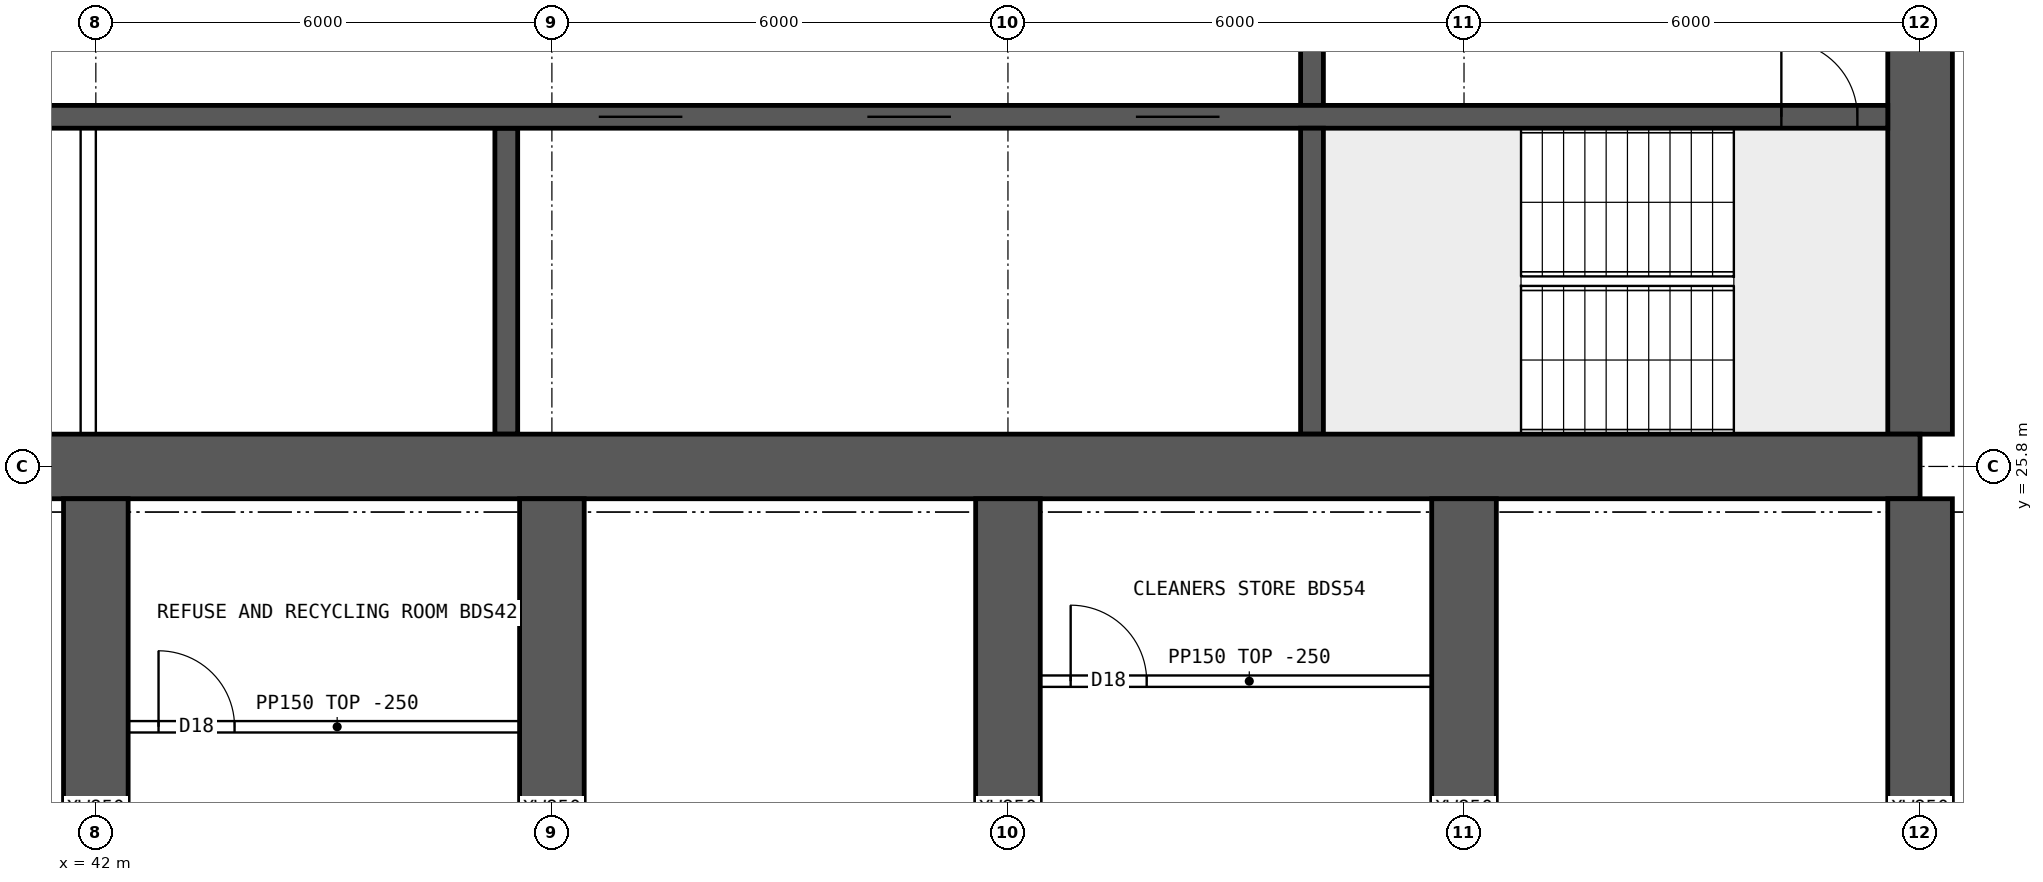
"""IFC4 building model, lengths in metres.
Left out: names, types, materials, properties, quantities, classifications, styles, units other than length and angle.
Written with IfcOpenShell. Run it as: python <this file> out.ifc"""

import sys

from ifc_helpers import new_model, si_unit, direction, frame, frame_2d, origin, place, context, subcontext, project, spatial, rectangle, extrude, element, fill, save


model = new_model("IFC4")
c1 = context("Model", 3, precision=1e-05, world=origin(), true_north=direction((0.0, 1.0)))
c2 = subcontext(c1, "Body", "Model", "MODEL_VIEW")
j1 = project(units=[si_unit("LENGTHUNIT", "METRE"), si_unit("PLANEANGLEUNIT", "RADIAN")], contexts=[c1])
p1 = place(None, origin())
s1 = spatial("IfcSite", under=j1, at=p1, CompositionType="ELEMENT")
p2 = place(p1, origin())
s2 = spatial("IfcBuilding", under=s1, at=p2, CompositionType="ELEMENT")
p3 = place(p2, frame((0.0, 0.0, 186.1)))
s3 = spatial("IfcBuildingStorey", under=s2, at=p3, CompositionType="ELEMENT", Elevation=186.1)
p4 = place(p3, frame((18.0, 25.8, 0.0), z_axis=(0.0, 0.0, 1.0), x_axis=(1.0, 0.0, 0.0)))
e1 = element("IfcWall", 1, at=p4, inside=s3, PredefinedType="SHEAR", context=c2, shape_type="SweptSolid", body=[
    extrude(rectangle(XDim=48.0, YDim=0.85, at=frame_2d((24.0, 0.0))), origin(), (0.0, 0.0, 1.0), 3.75),
])
p5 = place(p3, frame((66.0, 26.225, 0.0), z_axis=(0.0, 0.0, 1.0), x_axis=(0.0, 1.0, 0.0)))
e2 = element("IfcWall", 2, at=p5, inside=s3, PredefinedType="SHEAR", context=c2, shape_type="SweptSolid", body=[
    extrude(rectangle(XDim=11.55, YDim=0.85, at=frame_2d((5.775, 0.0))), origin(), (0.0, 0.0, 1.0), 3.75),
])
p6 = place(p5, frame((5.075, 0.0, 0.0)))
e3 = element("IfcOpeningElement", 3, at=p6, cuts=e2, PredefinedType="OPENING", context=c2, shape_type="SweptSolid", body=[
    extrude(rectangle(XDim=1.2, YDim=2.1, at=frame_2d((0.6, 1.05))), frame((0.0, 0.435, 0.0), z_axis=(0.0, -1.0, 0.0), x_axis=(1.0, 0.0, 0.0)), (0.0, 0.0, 1.0), 0.87),
])
p7 = place(p3, frame((18.425, 30.4, 0.0), z_axis=(0.0, 0.0, 1.0), x_axis=(1.0, 0.0, 0.0)))
e4 = element("IfcWall", 4, at=p7, inside=s3, PredefinedType="SHEAR", context=c2, shape_type="SweptSolid", body=[
    extrude(rectangle(XDim=47.15, YDim=0.3, at=frame_2d((23.575, 0.0))), origin(), (0.0, 0.0, 1.0), 3.75),
])
p8 = place(p7, frame((0.4, 0.0, 0.0)))
e5 = element("IfcOpeningElement", 5, at=p8, cuts=e4, PredefinedType="OPENING", context=c2, shape_type="SweptSolid", body=[
    extrude(rectangle(XDim=1.0, YDim=2.1, at=frame_2d((0.5, 1.05))), frame((0.0, 0.16, 0.0), z_axis=(0.0, -1.0, 0.0), x_axis=(1.0, 0.0, 0.0)), (0.0, 0.0, 1.0), 0.32),
])
p9 = place(p7, frame((45.75, 0.0, 0.0)))
e6 = element("IfcOpeningElement", 6, at=p9, cuts=e4, PredefinedType="OPENING", context=c2, shape_type="SweptSolid", body=[
    extrude(rectangle(XDim=1.0, YDim=2.1, at=frame_2d((0.5, 1.05))), frame((0.0, 0.16, 0.0), z_axis=(0.0, -1.0, 0.0), x_axis=(1.0, 0.0, 0.0)), (0.0, 0.0, 1.0), 0.32),
])
p10 = place(p7, frame((8.325, 0.0, 0.0)))
e7 = element("IfcOpeningElement", 7, at=p10, cuts=e4, PredefinedType="OPENING", context=c2, shape_type="SweptSolid", body=[
    extrude(rectangle(XDim=1.1, YDim=2.1, at=frame_2d((0.55, 1.05))), frame((0.0, 0.16, 0.0), z_axis=(0.0, -1.0, 0.0), x_axis=(1.0, 0.0, 0.0)), (0.0, 0.0, 1.0), 0.32),
])
p11 = place(p7, frame((10.925, 0.0, 0.0)))
e8 = element("IfcOpeningElement", 8, at=p11, cuts=e4, PredefinedType="OPENING", context=c2, shape_type="SweptSolid", body=[
    extrude(rectangle(XDim=1.1, YDim=2.1, at=frame_2d((0.55, 1.05))), frame((0.0, 0.16, 0.0), z_axis=(0.0, -1.0, 0.0), x_axis=(1.0, 0.0, 0.0)), (0.0, 0.0, 1.0), 0.32),
])
p12 = place(p7, frame((13.525, 0.0, 0.0)))
e9 = element("IfcOpeningElement", 9, at=p12, cuts=e4, PredefinedType="OPENING", context=c2, shape_type="SweptSolid", body=[
    extrude(rectangle(XDim=1.1, YDim=2.1, at=frame_2d((0.55, 1.05))), frame((0.0, 0.16, 0.0), z_axis=(0.0, -1.0, 0.0), x_axis=(1.0, 0.0, 0.0)), (0.0, 0.0, 1.0), 0.32),
])
p13 = place(p7, frame((16.125, 0.0, 0.0)))
e10 = element("IfcOpeningElement", 10, at=p13, cuts=e4, PredefinedType="OPENING", context=c2, shape_type="SweptSolid", body=[
    extrude(rectangle(XDim=1.1, YDim=2.1, at=frame_2d((0.55, 1.05))), frame((0.0, 0.16, 0.0), z_axis=(0.0, -1.0, 0.0), x_axis=(1.0, 0.0, 0.0)), (0.0, 0.0, 1.0), 0.32),
])
p14 = place(p7, frame((18.9, 0.0, 0.0)))
e11 = element("IfcOpeningElement", 11, at=p14, cuts=e4, PredefinedType="OPENING", context=c2, shape_type="SweptSolid", body=[
    extrude(rectangle(XDim=0.9, YDim=2.1, at=frame_2d((0.45, 1.05))), frame((0.0, 0.16, 0.0), z_axis=(0.0, -1.0, 0.0), x_axis=(1.0, 0.0, 0.0)), (0.0, 0.0, 1.0), 0.32),
])
p15 = place(p7, frame((30.192, 0.0, 0.0)))
e12 = element("IfcOpeningElement", 12, at=p15, cuts=e4, PredefinedType="OPENING", context=c2, shape_type="SweptSolid", body=[
    extrude(rectangle(XDim=1.1, YDim=2.1, at=frame_2d((0.55, 1.05))), frame((0.0, 0.16, 0.0), z_axis=(0.0, -1.0, 0.0), x_axis=(1.0, 0.0, 0.0)), (0.0, 0.0, 1.0), 0.32),
])
p16 = place(p7, frame((33.725, 0.0, 0.0)))
e13 = element("IfcOpeningElement", 13, at=p16, cuts=e4, PredefinedType="OPENING", context=c2, shape_type="SweptSolid", body=[
    extrude(rectangle(XDim=1.1, YDim=2.1, at=frame_2d((0.55, 1.05))), frame((0.0, 0.16, 0.0), z_axis=(0.0, -1.0, 0.0), x_axis=(1.0, 0.0, 0.0)), (0.0, 0.0, 1.0), 0.32),
])
p17 = place(p7, frame((37.258, 0.0, 0.0)))
e14 = element("IfcOpeningElement", 14, at=p17, cuts=e4, PredefinedType="OPENING", context=c2, shape_type="SweptSolid", body=[
    extrude(rectangle(XDim=1.1, YDim=2.1, at=frame_2d((0.55, 1.05))), frame((0.0, 0.16, 0.0), z_axis=(0.0, -1.0, 0.0), x_axis=(1.0, 0.0, 0.0)), (0.0, 0.0, 1.0), 0.32),
])
p18 = place(p3, frame((58.0, 26.225, 0.0), z_axis=(0.0, 0.0, 1.0), x_axis=(0.0, 1.0, 0.0)))
e15 = element("IfcWall", 15, at=p18, inside=s3, PredefinedType="SHEAR", context=c2, shape_type="SweptSolid", body=[
    extrude(rectangle(XDim=4.025, YDim=0.3, at=frame_2d((2.012, 0.0))), origin(), (0.0, 0.0, 1.0), 3.75),
])
p19 = place(p3, frame((58.0, 30.55, 0.0), z_axis=(0.0, 0.0, 1.0), x_axis=(0.0, 1.0, 0.0)))
e16 = element("IfcWall", 16, at=p19, inside=s3, PredefinedType="SHEAR", context=c2, shape_type="SweptSolid", body=[
    extrude(rectangle(XDim=3.9, YDim=0.3, at=frame_2d((1.95, 0.0))), origin(), (0.0, 0.0, 1.0), 3.75),
])
p20 = place(p19, frame((1.4, 0.0, 0.0)))
e17 = element("IfcOpeningElement", 17, at=p20, cuts=e16, PredefinedType="OPENING", context=c2, shape_type="SweptSolid", body=[
    extrude(rectangle(XDim=1.2, YDim=2.1, at=frame_2d((0.6, 1.05))), frame((0.0, 0.16, 0.0), z_axis=(0.0, -1.0, 0.0), x_axis=(1.0, 0.0, 0.0)), (0.0, 0.0, 1.0), 0.32),
])
p21 = place(p3, frame((47.4, 26.225, 0.0), z_axis=(0.0, 0.0, 1.0), x_axis=(0.0, 1.0, 0.0)))
e18 = element("IfcWall", 18, at=p21, inside=s3, PredefinedType="SHEAR", context=c2, shape_type="SweptSolid", body=[
    extrude(rectangle(XDim=4.025, YDim=0.3, at=frame_2d((2.012, 0.0))), origin(), (0.0, 0.0, 1.0), 3.75),
])
for number, where, z_axis, x_axis in (
    (19, (42.0, 17.2, 0.0), (0.0, 0.0, 1.0), (0.0, 1.0, 0.0)),
    (20, (48.0, 17.2, 0.0), (0.0, 0.0, 1.0), (0.0, 1.0, 0.0)),
    (21, (54.0, 17.2, 0.0), (0.0, 0.0, 1.0), (0.0, 1.0, 0.0)),
    (22, (60.0, 17.2, 0.0), (0.0, 0.0, 1.0), (0.0, 1.0, 0.0)),
    (23, (66.0, 17.2, 0.0), (0.0, 0.0, 1.0), (0.0, 1.0, 0.0)),
):
    element("IfcWall", number, at=place(p3, frame(where, z_axis=z_axis, x_axis=x_axis)), inside=s3, PredefinedType="SHEAR", context=c2, shape_type="SweptSolid", body=[
        extrude(rectangle(XDim=8.175, YDim=0.85, at=frame_2d((4.087, 0.0))), origin(), (0.0, 0.0, 1.0), 3.75),
    ])
p22 = place(p3, frame((41.9, 26.225, 0.0), z_axis=(0.0, 0.0, 1.0), x_axis=(0.0, 1.0, 0.0)))
e24 = element("IfcWall", 24, at=p22, inside=s3, PredefinedType="SOLIDWALL", context=c2, shape_type="SweptSolid", body=[
    extrude(rectangle(XDim=4.025, YDim=0.2, at=frame_2d((2.012, 0.0))), origin(), (0.0, 0.0, 1.0), 3.5),
])
p23 = place(p3, frame((42.425, 22.375, 0.0), z_axis=(0.0, 0.0, 1.0), x_axis=(1.0, 0.0, 0.0)))
e25 = element("IfcWall", 25, at=p23, inside=s3, PredefinedType="PARTITIONING", context=c2, shape_type="SweptSolid", body=[
    extrude(rectangle(XDim=5.5, YDim=0.15, at=frame_2d((2.75, 0.0))), origin(), (0.0, 0.0, 1.0), 3.5),
])
p24 = place(p23, frame((0.4, 0.0, 0.0)))
e26 = element("IfcOpeningElement", 26, at=p24, cuts=e25, PredefinedType="OPENING", context=c2, shape_type="SweptSolid", body=[
    extrude(rectangle(XDim=1.0, YDim=2.1, at=frame_2d((0.5, 1.05))), frame((0.0, 0.085, 0.0), z_axis=(0.0, -1.0, 0.0), x_axis=(1.0, 0.0, 0.0)), (0.0, 0.0, 1.0), 0.17),
])
p25 = place(p3, frame((54.425, 22.975, 0.0), z_axis=(0.0, 0.0, 1.0), x_axis=(1.0, 0.0, 0.0)))
e27 = element("IfcWall", 27, at=p25, inside=s3, PredefinedType="PARTITIONING", context=c2, shape_type="SweptSolid", body=[
    extrude(rectangle(XDim=5.5, YDim=0.15, at=frame_2d((2.75, 0.0))), origin(), (0.0, 0.0, 1.0), 3.5),
])
p26 = place(p25, frame((0.4, 0.0, 0.0)))
e28 = element("IfcOpeningElement", 28, at=p26, cuts=e27, PredefinedType="OPENING", context=c2, shape_type="SweptSolid", body=[
    extrude(rectangle(XDim=1.0, YDim=2.1, at=frame_2d((0.5, 1.05))), frame((0.0, 0.085, 0.0), z_axis=(0.0, -1.0, 0.0), x_axis=(1.0, 0.0, 0.0)), (0.0, 0.0, 1.0), 0.17),
])
p27 = place(p9, origin())
e29 = element("IfcDoor", 29, at=p27, inside=s3, OperationType="SINGLE_SWING_LEFT", PredefinedType="DOOR", context=c2, shape_type="SweptSolid", body=[
    extrude(rectangle(XDim=1.0, YDim=2.1, at=frame_2d((0.5, 1.05))), frame((0.0, 0.025, 0.0), z_axis=(0.0, -1.0, 0.0), x_axis=(1.0, 0.0, 0.0)), (0.0, 0.0, 1.0), 0.05),
])
fill(e6, e29)
p28 = place(p15, origin())
e30 = element("IfcDoor", 30, at=p28, inside=s3, OperationType="DOUBLE_DOOR_SLIDING", PredefinedType="DOOR", context=c2, shape_type="SweptSolid", body=[
    extrude(rectangle(XDim=1.1, YDim=2.1, at=frame_2d((0.55, 1.05))), frame((0.0, 0.025, 0.0), z_axis=(0.0, -1.0, 0.0), x_axis=(1.0, 0.0, 0.0)), (0.0, 0.0, 1.0), 0.05),
])
fill(e12, e30)
p29 = place(p16, origin())
e31 = element("IfcDoor", 31, at=p29, inside=s3, OperationType="DOUBLE_DOOR_SLIDING", PredefinedType="DOOR", context=c2, shape_type="SweptSolid", body=[
    extrude(rectangle(XDim=1.1, YDim=2.1, at=frame_2d((0.55, 1.05))), frame((0.0, 0.025, 0.0), z_axis=(0.0, -1.0, 0.0), x_axis=(1.0, 0.0, 0.0)), (0.0, 0.0, 1.0), 0.05),
])
fill(e13, e31)
p30 = place(p17, origin())
e32 = element("IfcDoor", 32, at=p30, inside=s3, OperationType="DOUBLE_DOOR_SLIDING", PredefinedType="DOOR", context=c2, shape_type="SweptSolid", body=[
    extrude(rectangle(XDim=1.1, YDim=2.1, at=frame_2d((0.55, 1.05))), frame((0.0, 0.025, 0.0), z_axis=(0.0, -1.0, 0.0), x_axis=(1.0, 0.0, 0.0)), (0.0, 0.0, 1.0), 0.05),
])
fill(e14, e32)
p31 = place(p24, origin())
e33 = element("IfcDoor", 33, at=p31, inside=s3, OperationType="SINGLE_SWING_LEFT", PredefinedType="DOOR", context=c2, shape_type="SweptSolid", body=[
    extrude(rectangle(XDim=1.0, YDim=2.1, at=frame_2d((0.5, 1.05))), frame((0.0, 0.025, 0.0), z_axis=(0.0, -1.0, 0.0), x_axis=(1.0, 0.0, 0.0)), (0.0, 0.0, 1.0), 0.05),
])
fill(e26, e33)
p32 = place(p26, origin())
e34 = element("IfcDoor", 34, at=p32, inside=s3, OperationType="SINGLE_SWING_LEFT", PredefinedType="DOOR", context=c2, shape_type="SweptSolid", body=[
    extrude(rectangle(XDim=1.0, YDim=2.1, at=frame_2d((0.5, 1.05))), frame((0.0, 0.025, 0.0), z_axis=(0.0, -1.0, 0.0), x_axis=(1.0, 0.0, 0.0)), (0.0, 0.0, 1.0), 0.05),
])
fill(e28, e34)
save(model, sys.argv[1])
